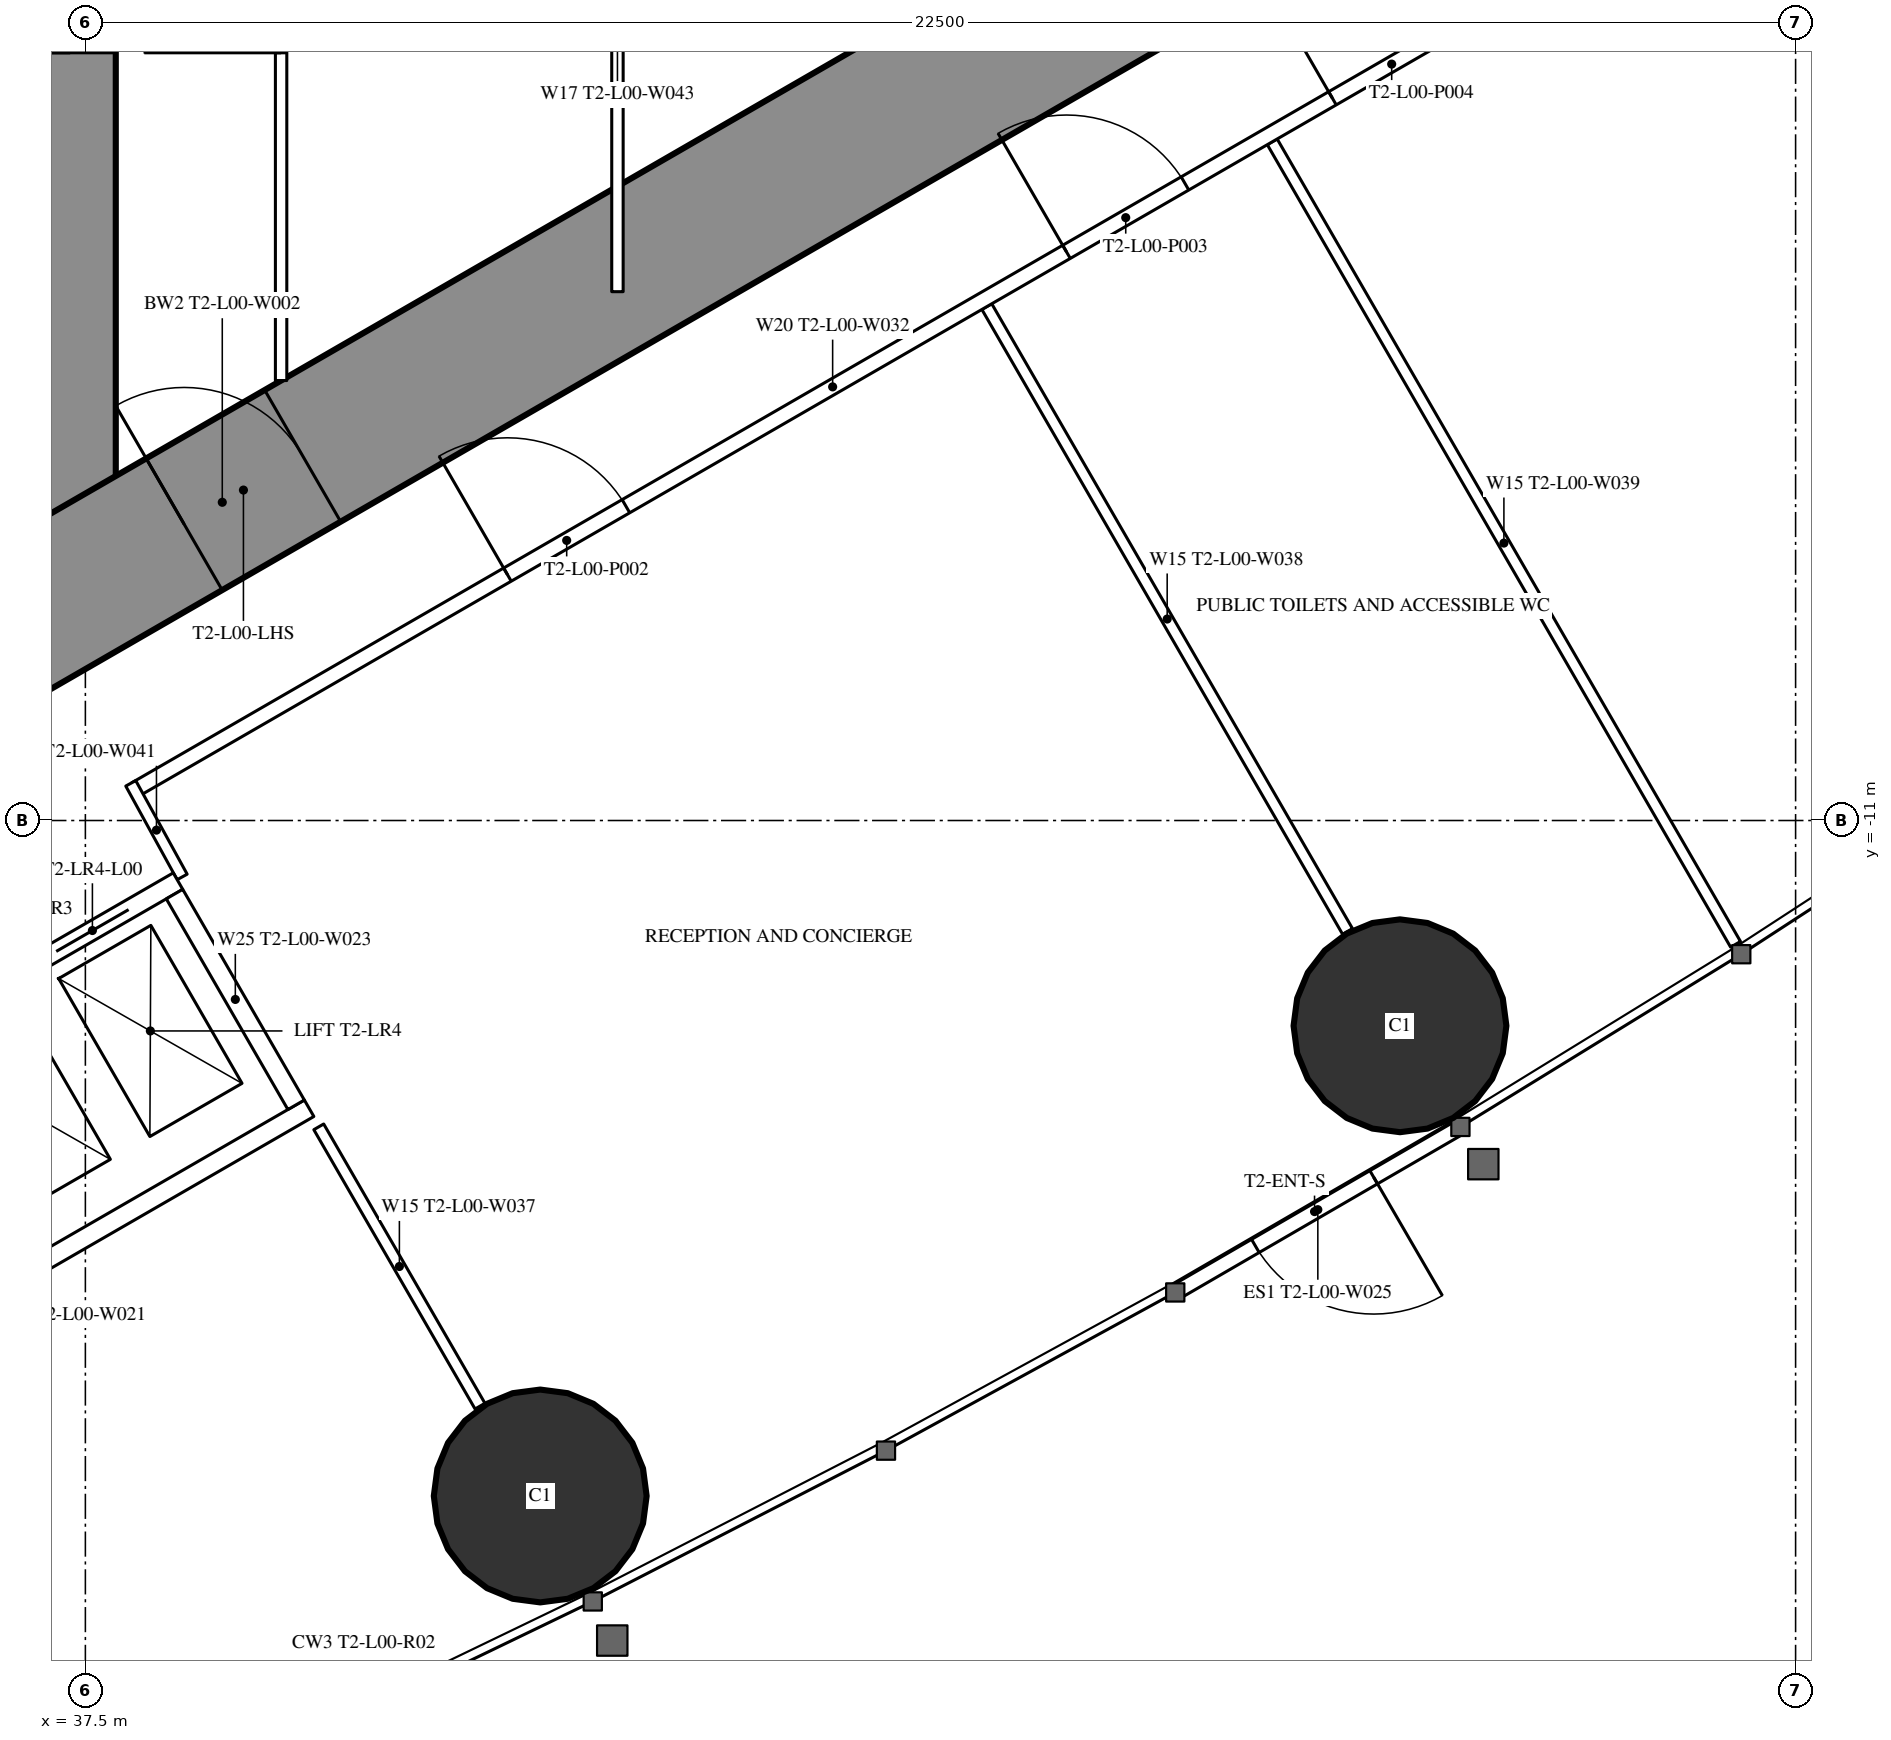
"""IFC4 building model, lengths in metres.
Left out: names, types, materials, properties, quantities, classifications, styles, units other than length and angle.
Written with IfcOpenShell. Run it as: python <this file> out.ifc"""

import sys

from ifc_helpers import new_model, si_unit, direction, frame, frame_2d, origin, origin_2d, place, context, subcontext, project, spatial, rectangle, hollow_circle, extrude, element, fill, save


model = new_model("IFC4")
c1 = context("Model", 3, precision=1e-05, world=origin(), true_north=direction((0.0, 1.0)))
c2 = subcontext(c1, "Body", "Model", "MODEL_VIEW")
j1 = project(units=[si_unit("LENGTHUNIT", "METRE"), si_unit("PLANEANGLEUNIT", "RADIAN")], contexts=[c1])
p1 = place(None, origin())
s1 = spatial("IfcSite", under=j1, at=p1, CompositionType="ELEMENT")
p2 = place(p1, origin())
s2 = spatial("IfcBuilding", under=s1, at=p2, CompositionType="ELEMENT")
p3 = place(p2, origin())
s3 = spatial("IfcBuildingStorey", under=s2, at=p3, CompositionType="ELEMENT", Elevation=0.0)
for number, where, z_axis, x_axis in (
    (1, (43.484, -19.886, 0.0), (0.0, 0.0, 1.0), (1.0, 0.0, 0.0)),
    (2, (54.795, -13.701, 0.0), (0.0, 0.0, 1.0), (1.0, 0.0, 0.0)),
):
    element("IfcColumn", number, at=place(p3, frame(where, z_axis=z_axis, x_axis=x_axis)), inside=s3, PredefinedType="COLUMN", context=c2, shape_type="SweptSolid", body=[
        extrude(hollow_circle(Radius=1.4, WallThickness=0.12, at=origin_2d()), origin(), (0.0, 0.0, 1.0), 7.2),
    ])
p4 = place(p3, frame((61.5, 0.0, 0.0), z_axis=(0.0, 0.0, 1.0), x_axis=(1.0, 0.0, 0.0)))
e3 = element("IfcColumn", 3, at=p4, inside=s3, PredefinedType="COLUMN", context=c2, shape_type="SweptSolid", body=[
    extrude(hollow_circle(Radius=1.4, WallThickness=0.1, at=origin_2d()), origin(), (0.0, 0.0, 1.0), 7.2),
])
p5 = place(p3, frame((37.3, -8.6, 0.0), z_axis=(0.0, 0.0, 1.0), x_axis=(0.0, 1.0, 0.0)))
e4 = element("IfcWall", 4, at=p5, inside=s3, PredefinedType="SHEAR", context=c2, shape_type="SweptSolid", body=[
    extrude(rectangle(XDim=17.2, YDim=1.2, at=frame_2d((8.6, 0.0))), origin(), (0.0, 0.0, 1.0), 7.2),
])
p6 = place(p5, frame((7.7, 0.0, 0.0)))
e5 = element("IfcOpeningElement", 5, at=p6, cuts=e4, PredefinedType="OPENING", context=c2, shape_type="SweptSolid", body=[
    extrude(rectangle(XDim=1.8, YDim=2.2, at=frame_2d((0.9, 1.1))), frame((0.0, 0.61, 0.0), z_axis=(0.0, -1.0, 0.0), x_axis=(1.0, 0.0, 0.0)), (0.0, 0.0, 1.0), 1.22),
])
p7 = place(p3, frame((27.2, -13.8, 0.0), z_axis=(0.0, 0.0, 1.0), x_axis=(0.866027159892, 0.499996958321, 0.0)))
e6 = element("IfcWall", 6, at=p7, inside=s3, PredefinedType="SHEAR", context=c2, shape_type="SweptSolid", body=[
    extrude(rectangle(XDim=27.947, YDim=2.0, at=frame_2d((13.973, 0.0))), origin(), (0.0, 0.0, 1.0), 7.2),
])
p8 = place(p7, frame((4.6, 0.0, 0.0)))
e7 = element("IfcOpeningElement", 7, at=p8, cuts=e6, PredefinedType="OPENING", context=c2, shape_type="SweptSolid", body=[
    extrude(rectangle(XDim=1.0, YDim=2.2, at=frame_2d((0.5, 1.1))), frame((0.0, 1.01, 0.0), z_axis=(0.0, -1.0, 0.0), x_axis=(1.0, 0.0, 0.0)), (0.0, 0.0, 1.0), 2.02),
])
p9 = place(p7, frame((13.395, 0.0, 0.0)))
e8 = element("IfcOpeningElement", 8, at=p9, cuts=e6, PredefinedType="OPENING", context=c2, shape_type="SweptSolid", body=[
    extrude(rectangle(XDim=1.8, YDim=2.2, at=frame_2d((0.9, 1.1))), frame((0.0, 1.01, 0.0), z_axis=(0.0, -1.0, 0.0), x_axis=(1.0, 0.0, 0.0)), (0.0, 0.0, 1.0), 2.02),
])
p10 = place(p3, frame((55.59, -15.031, 0.0), z_axis=(0.0, 0.0, 1.0), x_axis=(-0.864866989785, -0.502001085637, 0.0)))
e9 = element("IfcWall", 9, at=p10, inside=s3, PredefinedType="STANDARD", context=c2, shape_type="SweptSolid", body=[
    extrude(rectangle(XDim=4.338, YDim=0.2, at=frame_2d((2.169, 0.0))), origin(), (0.0, 0.0, 1.0), 6.85),
])
p11 = place(p10, frame((1.319, 0.0, 0.0)))
e10 = element("IfcOpeningElement", 10, at=p11, cuts=e9, PredefinedType="OPENING", context=c2, shape_type="SweptSolid", body=[
    extrude(rectangle(XDim=1.8, YDim=2.4, at=frame_2d((0.9, 1.2))), frame((0.0, 0.11, 0.0), z_axis=(0.0, -1.0, 0.0), x_axis=(1.0, 0.0, 0.0)), (0.0, 0.0, 1.0), 0.22),
])
p12 = place(p3, frame((49.36, -4.239, 0.0), z_axis=(0.0, 0.0, 1.0), x_axis=(0.499984446848, -0.866034383215, 0.0)))
e11 = element("IfcWall", 11, at=p12, inside=s3, PredefinedType="PARTITIONING", context=c2, shape_type="SweptSolid", body=[
    extrude(rectangle(XDim=9.491, YDim=0.15, at=frame_2d((4.746, 0.0))), origin(), (0.0, 0.0, 1.0), 5.85),
])
p13 = place(p3, frame((53.115, -2.071, 0.0), z_axis=(0.0, 0.0, 1.0), x_axis=(0.500000975677, -0.866024840476, 0.0)))
e12 = element("IfcWall", 12, at=p13, inside=s3, PredefinedType="PARTITIONING", context=c2, shape_type="SweptSolid", body=[
    extrude(rectangle(XDim=12.191, YDim=0.15, at=frame_2d((6.095, 0.0))), origin(), (0.0, 0.0, 1.0), 6.85),
])
p14 = place(p3, frame((40.57, -15.03, 0.0), z_axis=(0.0, 0.0, 1.0), x_axis=(0.500012993597, -0.866017901798, 0.0)))
e13 = element("IfcWall", 13, at=p14, inside=s3, PredefinedType="PARTITIONING", context=c2, shape_type="SweptSolid", body=[
    extrude(rectangle(XDim=4.243, YDim=0.15, at=frame_2d((2.122, 0.0))), origin(), (0.0, 0.0, 1.0), 6.85),
])
p15 = place(p3, frame((38.16, -10.59, 0.0), z_axis=(0.0, 0.0, 1.0), x_axis=(0.866027029586, 0.499997184019, 0.0)))
e14 = element("IfcWall", 14, at=p15, inside=s3, PredefinedType="PARTITIONING", context=c2, shape_type="SweptSolid", body=[
    extrude(rectangle(XDim=21.18, YDim=0.2, at=frame_2d((10.59, 0.0))), origin(), (0.0, 0.0, 1.0), 6.85),
])
p16 = place(p15, frame((14.142, 0.0, 0.0)))
e15 = element("IfcOpeningElement", 15, at=p16, cuts=e14, PredefinedType="OPENING", context=c2, shape_type="SweptSolid", body=[
    extrude(rectangle(XDim=1.8, YDim=2.2, at=frame_2d((0.9, 1.1))), frame((0.0, 0.11, 0.0), z_axis=(0.0, -1.0, 0.0), x_axis=(1.0, 0.0, 0.0)), (0.0, 0.0, 1.0), 0.22),
])
p17 = place(p15, frame((18.183, 0.0, 0.0)))
e16 = element("IfcOpeningElement", 16, at=p17, cuts=e14, PredefinedType="OPENING", context=c2, shape_type="SweptSolid", body=[
    extrude(rectangle(XDim=1.8, YDim=2.2, at=frame_2d((0.9, 1.1))), frame((0.0, 0.11, 0.0), z_axis=(0.0, -1.0, 0.0), x_axis=(1.0, 0.0, 0.0)), (0.0, 0.0, 1.0), 0.22),
])
p18 = place(p15, frame((5.65, 0.0, 0.0)))
e17 = element("IfcOpeningElement", 17, at=p18, cuts=e14, PredefinedType="OPENING", context=c2, shape_type="SweptSolid", body=[
    extrude(rectangle(XDim=1.8, YDim=2.2, at=frame_2d((0.9, 1.1))), frame((0.0, 0.11, 0.0), z_axis=(0.0, -1.0, 0.0), x_axis=(1.0, 0.0, 0.0)), (0.0, 0.0, 1.0), 0.22),
])
p19 = place(p3, frame((38.773, -11.742, 0.0), z_axis=(0.0, 0.0, 1.0), x_axis=(-0.481418475768, 0.876490873421, 0.0)))
e18 = element("IfcWall", 18, at=p19, inside=s3, PredefinedType="PARTITIONING", context=c2, shape_type="SweptSolid", body=[
    extrude(rectangle(XDim=1.405, YDim=0.15, at=frame_2d((0.703, 0.0))), origin(), (0.0, 0.0, 1.0), 6.85),
])
p20 = place(p3, frame((40.075, -5.212, 0.0), z_axis=(0.0, 0.0, 1.0), x_axis=(0.0, 1.0, 0.0)))
e19 = element("IfcWall", 19, at=p20, inside=s3, PredefinedType="PARTITIONING", context=c2, shape_type="SweptSolid", body=[
    extrude(rectangle(XDim=10.424, YDim=0.15, at=frame_2d((5.212, 0.0))), origin(), (0.0, 0.0, 1.0), 6.85),
])
p21 = place(p20, frame((4.312, 0.0, 0.0)))
e20 = element("IfcOpeningElement", 20, at=p21, cuts=e19, PredefinedType="OPENING", context=c2, shape_type="SweptSolid", body=[
    extrude(rectangle(XDim=1.8, YDim=2.2, at=frame_2d((0.9, 1.1))), frame((0.0, 0.085, 0.0), z_axis=(0.0, -1.0, 0.0), x_axis=(1.0, 0.0, 0.0)), (0.0, 0.0, 1.0), 0.17),
])
p22 = place(p3, frame((44.5, -4.043, 0.0), z_axis=(0.0, 0.0, 1.0), x_axis=(0.0, 1.0, 0.0)))
e21 = element("IfcWall", 21, at=p22, inside=s3, PredefinedType="PARTITIONING", context=c2, shape_type="SweptSolid", body=[
    extrude(rectangle(XDim=8.085, YDim=0.15, at=frame_2d((4.043, 0.0))), origin(), (0.0, 0.0, 1.0), 5.45),
])
p23 = place(p22, frame((3.543, 0.0, 0.0)))
e22 = element("IfcOpeningElement", 22, at=p23, cuts=e21, PredefinedType="OPENING", context=c2, shape_type="SweptSolid", body=[
    extrude(rectangle(XDim=1.0, YDim=2.2, at=frame_2d((0.5, 1.1))), frame((0.0, 0.085, 0.0), z_axis=(0.0, -1.0, 0.0), x_axis=(1.0, 0.0, 0.0)), (0.0, 0.0, 1.0), 0.17),
])
p24 = place(p3, frame((31.271, -16.097, 0.0), z_axis=(0.0, 0.0, 1.0), x_axis=(0.86604045752, 0.499973925258, 0.0)))
e23 = element("IfcWall", 23, at=p24, inside=s3, PredefinedType="PARTITIONING", context=c2, shape_type="SweptSolid", body=[
    extrude(rectangle(XDim=8.6, YDim=0.25, at=frame_2d((4.3, 0.0))), origin(), (0.0, 0.0, 1.0), 6.85),
])
p25 = place(p24, frame((0.75, 0.0, 0.0)))
e24 = element("IfcOpeningElement", 24, at=p25, cuts=e23, PredefinedType="OPENING", context=c2, shape_type="SweptSolid", body=[
    extrude(rectangle(XDim=1.1, YDim=2.2, at=frame_2d((0.55, 1.1))), frame((0.0, 0.135, 0.0), z_axis=(0.0, -1.0, 0.0), x_axis=(1.0, 0.0, 0.0)), (0.0, 0.0, 1.0), 0.27),
])
p26 = place(p24, frame((2.75, 0.0, 0.0)))
e25 = element("IfcOpeningElement", 25, at=p26, cuts=e23, PredefinedType="OPENING", context=c2, shape_type="SweptSolid", body=[
    extrude(rectangle(XDim=1.1, YDim=2.2, at=frame_2d((0.55, 1.1))), frame((0.0, 0.135, 0.0), z_axis=(0.0, -1.0, 0.0), x_axis=(1.0, 0.0, 0.0)), (0.0, 0.0, 1.0), 0.27),
])
p27 = place(p24, frame((4.75, 0.0, 0.0)))
e26 = element("IfcOpeningElement", 26, at=p27, cuts=e23, PredefinedType="OPENING", context=c2, shape_type="SweptSolid", body=[
    extrude(rectangle(XDim=1.1, YDim=2.2, at=frame_2d((0.55, 1.1))), frame((0.0, 0.135, 0.0), z_axis=(0.0, -1.0, 0.0), x_axis=(1.0, 0.0, 0.0)), (0.0, 0.0, 1.0), 0.27),
])
p28 = place(p24, frame((6.75, 0.0, 0.0)))
e27 = element("IfcOpeningElement", 27, at=p28, cuts=e23, PredefinedType="OPENING", context=c2, shape_type="SweptSolid", body=[
    extrude(rectangle(XDim=1.1, YDim=2.2, at=frame_2d((0.55, 1.1))), frame((0.0, 0.135, 0.0), z_axis=(0.0, -1.0, 0.0), x_axis=(1.0, 0.0, 0.0)), (0.0, 0.0, 1.0), 0.27),
])
p29 = place(p3, frame((32.996, -19.086, 0.0), z_axis=(0.0, 0.0, 1.0), x_axis=(0.866028165386, 0.499995216735, 0.0)))
e28 = element("IfcWall", 28, at=p29, inside=s3, PredefinedType="PARTITIONING", context=c2, shape_type="SweptSolid", body=[
    extrude(rectangle(XDim=8.6, YDim=0.25, at=frame_2d((4.3, 0.0))), origin(), (0.0, 0.0, 1.0), 6.85),
])
p30 = place(p3, frame((38.673, -11.968, 0.0), z_axis=(0.0, 0.0, 1.0), x_axis=(0.499929347863, -0.866066190972, 0.0)))
e29 = element("IfcWall", 29, at=p30, inside=s3, PredefinedType="PARTITIONING", context=c2, shape_type="SweptSolid", body=[
    extrude(rectangle(XDim=3.201, YDim=0.25, at=frame_2d((1.6, 0.0))), origin(), (0.0, 0.0, 1.0), 6.85),
])
p31 = place(p11, origin())
e30 = element("IfcDoor", 30, at=p31, inside=s3, OperationType="SINGLE_SWING_LEFT", PredefinedType="DOOR", context=c2, shape_type="SweptSolid", body=[
    extrude(rectangle(XDim=1.8, YDim=2.4, at=frame_2d((0.9, 1.2))), frame((0.0, 0.025, 0.0), z_axis=(0.0, -1.0, 0.0), x_axis=(1.0, 0.0, 0.0)), (0.0, 0.0, 1.0), 0.05),
])
fill(e10, e30)
p32 = place(p16, origin())
e31 = element("IfcDoor", 31, at=p32, inside=s3, OperationType="DOUBLE_DOOR_SINGLE_SWING", PredefinedType="DOOR", context=c2, shape_type="SweptSolid", body=[
    extrude(rectangle(XDim=1.8, YDim=2.2, at=frame_2d((0.9, 1.1))), frame((0.0, 0.025, 0.0), z_axis=(0.0, -1.0, 0.0), x_axis=(1.0, 0.0, 0.0)), (0.0, 0.0, 1.0), 0.05),
])
fill(e15, e31)
p33 = place(p17, origin())
e32 = element("IfcDoor", 32, at=p33, inside=s3, OperationType="DOUBLE_DOOR_SINGLE_SWING", PredefinedType="DOOR", context=c2, shape_type="SweptSolid", body=[
    extrude(rectangle(XDim=1.8, YDim=2.2, at=frame_2d((0.9, 1.1))), frame((0.0, 0.025, 0.0), z_axis=(0.0, -1.0, 0.0), x_axis=(1.0, 0.0, 0.0)), (0.0, 0.0, 1.0), 0.05),
])
fill(e16, e32)
p34 = place(p18, origin())
e33 = element("IfcDoor", 33, at=p34, inside=s3, OperationType="DOUBLE_DOOR_SINGLE_SWING", PredefinedType="DOOR", context=c2, shape_type="SweptSolid", body=[
    extrude(rectangle(XDim=1.8, YDim=2.2, at=frame_2d((0.9, 1.1))), frame((0.0, 0.025, 0.0), z_axis=(0.0, -1.0, 0.0), x_axis=(1.0, 0.0, 0.0)), (0.0, 0.0, 1.0), 0.05),
])
fill(e17, e33)
p35 = place(p21, origin())
e34 = element("IfcDoor", 34, at=p35, inside=s3, OperationType="DOUBLE_DOOR_SINGLE_SWING", PredefinedType="DOOR", context=c2, shape_type="SweptSolid", body=[
    extrude(rectangle(XDim=1.8, YDim=2.2, at=frame_2d((0.9, 1.1))), frame((0.0, 0.025, 0.0), z_axis=(0.0, -1.0, 0.0), x_axis=(1.0, 0.0, 0.0)), (0.0, 0.0, 1.0), 0.05),
])
fill(e20, e34)
p36 = place(p9, origin())
e35 = element("IfcDoor", 35, at=p36, inside=s3, OperationType="DOUBLE_DOOR_SINGLE_SWING", PredefinedType="DOOR", context=c2, shape_type="SweptSolid", body=[
    extrude(rectangle(XDim=1.8, YDim=2.2, at=frame_2d((0.9, 1.1))), frame((0.0, 0.025, 0.0), z_axis=(0.0, -1.0, 0.0), x_axis=(1.0, 0.0, 0.0)), (0.0, 0.0, 1.0), 0.05),
])
fill(e8, e35)
p37 = place(p6, origin())
e36 = element("IfcDoor", 36, at=p37, inside=s3, OperationType="DOUBLE_DOOR_SINGLE_SWING", PredefinedType="DOOR", context=c2, shape_type="SweptSolid", body=[
    extrude(rectangle(XDim=1.8, YDim=2.2, at=frame_2d((0.9, 1.1))), frame((0.0, 0.025, 0.0), z_axis=(0.0, -1.0, 0.0), x_axis=(1.0, 0.0, 0.0)), (0.0, 0.0, 1.0), 0.05),
])
fill(e5, e36)
p38 = place(p28, origin())
e37 = element("IfcDoor", 37, at=p38, inside=s3, OperationType="DOUBLE_DOOR_SLIDING", PredefinedType="USERDEFINED", context=c2, shape_type="SweptSolid", body=[
    extrude(rectangle(XDim=1.1, YDim=2.2, at=frame_2d((0.55, 1.1))), frame((0.0, 0.025, 0.0), z_axis=(0.0, -1.0, 0.0), x_axis=(1.0, 0.0, 0.0)), (0.0, 0.0, 1.0), 0.05),
])
fill(e27, e37)
save(model, sys.argv[1])
